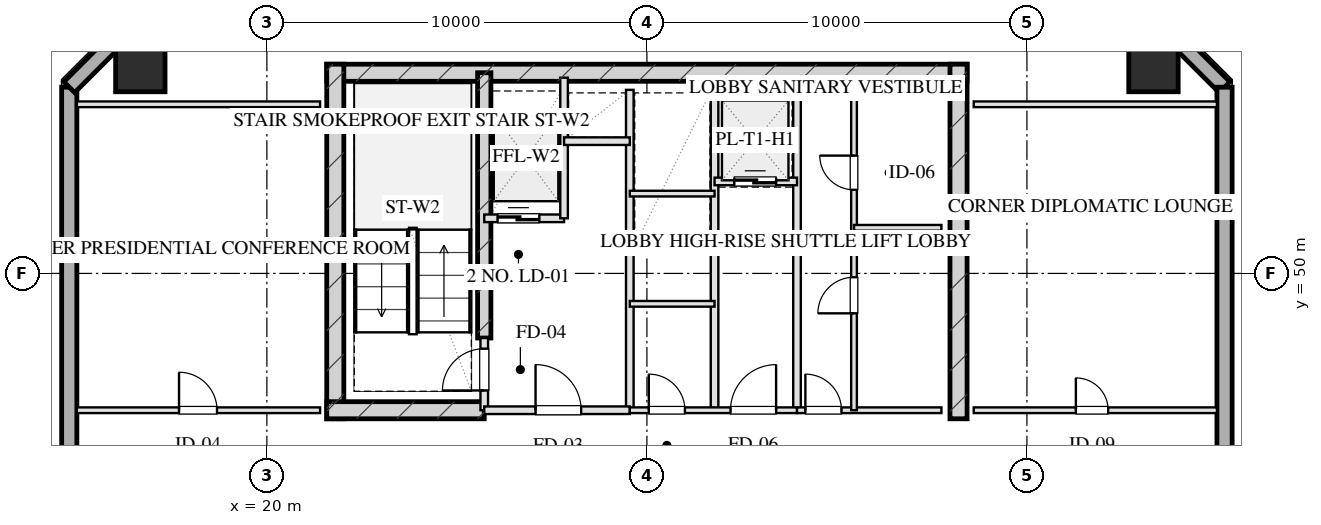
"""IFC4 building model, lengths in metres.
Left out: names, types, materials, properties, quantities, classifications, styles, units other than length and angle.
Written with IfcOpenShell. Run it as: python <this file> out.ifc"""

import sys

from ifc_helpers import new_model, si_unit, direction, frame, frame_2d, origin, origin_2d, place, context, subcontext, project, spatial, rectangle, hollow_rectangle, extrude, element, fill, save


model = new_model("IFC4")
c1 = context("Model", 3, precision=1e-05, world=origin(), true_north=direction((0.0, 1.0)))
c2 = subcontext(c1, "Body", "Model", "MODEL_VIEW")
j1 = project(units=[si_unit("LENGTHUNIT", "METRE"), si_unit("PLANEANGLEUNIT", "RADIAN")], contexts=[c1])
p1 = place(None, origin())
s1 = spatial("IfcSite", under=j1, at=p1, CompositionType="ELEMENT")
p2 = place(p1, origin())
s2 = spatial("IfcBuilding", under=s1, at=p2, CompositionType="ELEMENT")
p3 = place(p2, frame((0.0, 0.0, 240.8)))
s3 = spatial("IfcBuildingStorey", under=s2, at=p3, CompositionType="ELEMENT", Elevation=240.8)
p4 = place(p3, frame((21.575, 55.28, 0.0), z_axis=(0.0, 0.0, 1.0), x_axis=(1.0, 0.0, 0.0)))
e1 = element("IfcWall", 1, at=p4, inside=s3, PredefinedType="SHEAR", context=c2, shape_type="SweptSolid", body=[
    extrude(rectangle(XDim=16.85, YDim=0.45, at=frame_2d((8.425, 0.0))), origin(), (0.0, 0.0, 1.0), 3.2),
])
for number, where, z_axis, x_axis in (
    (2, (21.8, 46.175, 0.0), (0.0, 0.0, 1.0), (0.0, 1.0, 0.0)),
    (3, (38.2, 46.175, 0.0), (0.0, 0.0, 1.0), (0.0, 1.0, 0.0)),
):
    element("IfcWall", number, at=place(p3, frame(where, z_axis=z_axis, x_axis=x_axis)), inside=s3, PredefinedType="SHEAR", context=c2, shape_type="SweptSolid", body=[
        extrude(rectangle(XDim=9.33, YDim=0.45, at=frame_2d((4.665, 0.0))), origin(), (0.0, 0.0, 1.0), 3.2),
    ])
p5 = place(p3, frame((25.72, 48.3, 0.0), z_axis=(0.0, 0.0, 1.0), x_axis=(0.0, 1.0, 0.0)))
e4 = element("IfcWall", 4, at=p5, inside=s3, PredefinedType="SHEAR", context=c2, shape_type="SweptSolid", body=[
    extrude(rectangle(XDim=6.98, YDim=0.35, at=frame_2d((3.49, 0.0))), origin(), (0.0, 0.0, 1.0), 3.2),
])
p6 = place(p3, frame((21.575, 46.4, 0.0), z_axis=(0.0, 0.0, 1.0), x_axis=(1.0, 0.0, 0.0)))
e5 = element("IfcWall", 5, at=p6, inside=s3, PredefinedType="SHEAR", context=c2, shape_type="SweptSolid", body=[
    extrude(rectangle(XDim=4.145, YDim=0.45, at=frame_2d((2.073, 0.0))), origin(), (0.0, 0.0, 1.0), 3.2),
])
for number, where, z_axis, x_axis in (
    (6, (43.33, 55.43, 0.0), (0.0, 0.0, 1.0), (1.0, 0.0, 0.0)),
    (7, (16.67, 55.43, 0.0), (0.0, 0.0, 1.0), (1.0, 0.0, 0.0)),
):
    element("IfcColumn", number, at=place(p3, frame(where, z_axis=z_axis, x_axis=x_axis)), inside=s3, PredefinedType="COLUMN", context=c2, shape_type="SweptSolid", body=[
        extrude(hollow_rectangle(XDim=1.3, YDim=1.3, WallThickness=0.045, at=origin_2d()), origin(), (0.0, 0.0, 1.0), 3.201),
    ])
p7 = place(p3, frame((14.8, 13.1, 0.0), z_axis=(0.0, 0.0, 1.0), x_axis=(0.0, 1.0, 0.0)))
e8 = element("IfcWall", 8, at=p7, inside=s3, PredefinedType="SOLIDWALL", context=c2, shape_type="SweptSolid", body=[
    extrude(rectangle(XDim=41.8, YDim=0.4, at=frame_2d((20.9, 0.0))), origin(), (0.0, 0.0, 1.0), 2.36),
])
p8 = place(p7, frame((13.525, 0.0, 0.75)))
e9 = element("IfcOpeningElement", 9, at=p8, cuts=e8, PredefinedType="OPENING", context=c2, shape_type="SweptSolid", body=[
    extrude(rectangle(XDim=1.95, YDim=1.21, at=frame_2d((0.975, 0.605))), frame((0.0, 0.21, 0.0), z_axis=(0.0, -1.0, 0.0), x_axis=(1.0, 0.0, 0.0)), (0.0, 0.0, 1.0), 0.42),
])
p9 = place(p7, frame((17.325, 0.0, 0.75)))
e10 = element("IfcOpeningElement", 10, at=p9, cuts=e8, PredefinedType="OPENING", context=c2, shape_type="SweptSolid", body=[
    extrude(rectangle(XDim=1.95, YDim=1.21, at=frame_2d((0.975, 0.605))), frame((0.0, 0.21, 0.0), z_axis=(0.0, -1.0, 0.0), x_axis=(1.0, 0.0, 0.0)), (0.0, 0.0, 1.0), 0.42),
])
p10 = place(p7, frame((23.2, 0.0, 0.0)))
e11 = element("IfcOpeningElement", 11, at=p10, cuts=e8, PredefinedType="OPENING", context=c2, shape_type="SweptSolid", body=[
    extrude(rectangle(XDim=1.1, YDim=2.15, at=frame_2d((0.55, 1.075))), frame((0.0, 0.21, 0.0), z_axis=(0.0, -1.0, 0.0), x_axis=(1.0, 0.0, 0.0)), (0.0, 0.0, 1.0), 0.42),
])
for number, where, z_axis, x_axis in (
    (12, (14.8, 54.9, 0.0), (0.0, 0.0, 1.0), (0.707, 0.707, 0.0)),
    (13, (42.8, 57.3, 0.0), (0.0, 0.0, 1.0), (0.707, -0.707, 0.0)),
):
    element("IfcWall", number, at=place(p3, frame(where, z_axis=z_axis, x_axis=x_axis)), inside=s3, PredefinedType="SOLIDWALL", context=c2, shape_type="SweptSolid", body=[
        extrude(rectangle(XDim=3.394, YDim=0.4, at=frame_2d((1.697, 0.0))), origin(), (0.0, 0.0, 1.0), 2.36),
    ])
p11 = place(p3, frame((45.2, 54.9, 0.0), z_axis=(0.0, 0.0, 1.0), x_axis=(0.0, -1.0, 0.0)))
e14 = element("IfcWall", 14, at=p11, inside=s3, PredefinedType="SOLIDWALL", context=c2, shape_type="SweptSolid", body=[
    extrude(rectangle(XDim=41.8, YDim=0.4, at=frame_2d((20.9, 0.0))), origin(), (0.0, 0.0, 1.0), 2.36),
])
p12 = place(p11, frame((26.325, 0.0, 0.75)))
e15 = element("IfcOpeningElement", 15, at=p12, cuts=e14, PredefinedType="OPENING", context=c2, shape_type="SweptSolid", body=[
    extrude(rectangle(XDim=1.95, YDim=1.21, at=frame_2d((0.975, 0.605))), frame((0.0, 0.21, 0.0), z_axis=(0.0, -1.0, 0.0), x_axis=(1.0, 0.0, 0.0)), (0.0, 0.0, 1.0), 0.42),
])
p13 = place(p11, frame((22.525, 0.0, 0.75)))
e16 = element("IfcOpeningElement", 16, at=p13, cuts=e14, PredefinedType="OPENING", context=c2, shape_type="SweptSolid", body=[
    extrude(rectangle(XDim=1.95, YDim=1.21, at=frame_2d((0.975, 0.605))), frame((0.0, 0.21, 0.0), z_axis=(0.0, -1.0, 0.0), x_axis=(1.0, 0.0, 0.0)), (0.0, 0.0, 1.0), 0.42),
])
p14 = place(p11, frame((17.5, 0.0, 0.0)))
e17 = element("IfcOpeningElement", 17, at=p14, cuts=e14, PredefinedType="OPENING", context=c2, shape_type="SweptSolid", body=[
    extrude(rectangle(XDim=1.1, YDim=2.15, at=frame_2d((0.55, 1.075))), frame((0.0, 0.21, 0.0), z_axis=(0.0, -1.0, 0.0), x_axis=(1.0, 0.0, 0.0)), (0.0, 0.0, 1.0), 0.42),
])
p15 = place(p3, frame((25.72, 46.4, 0.0), z_axis=(0.0, 0.0, 1.0), x_axis=(0.0, 1.0, 0.0)))
e18 = element("IfcWall", 18, at=p15, inside=s3, PredefinedType="PARTITIONING", context=c2, shape_type="SweptSolid", body=[
    extrude(rectangle(XDim=1.9, YDim=0.2, at=frame_2d((0.95, 0.0))), origin(), (0.0, 0.0, 1.0), 2.925),
])
p16 = place(p15, frame((0.52, 0.0, 0.0)))
e19 = element("IfcOpeningElement", 19, at=p16, cuts=e18, PredefinedType="OPENING", context=c2, shape_type="SweptSolid", body=[
    extrude(rectangle(XDim=1.1, YDim=2.05, at=frame_2d((0.55, 1.025))), frame((0.0, 0.11, 0.0), z_axis=(0.0, -1.0, 0.0), x_axis=(1.0, 0.0, 0.0)), (0.0, 0.0, 1.0), 0.22),
])
p17 = place(p3, frame((29.55, 46.4, 0.0), z_axis=(0.0, 0.0, 1.0), x_axis=(0.0, 1.0, 0.0)))
e20 = element("IfcWall", 20, at=p17, inside=s3, PredefinedType="PARTITIONING", context=c2, shape_type="SweptSolid", body=[
    extrude(rectangle(XDim=8.43, YDim=0.2, at=frame_2d((4.215, 0.0))), origin(), (0.0, 0.0, 1.0), 2.925),
])
p18 = place(p3, frame((25.72, 46.4, 0.0), z_axis=(0.0, 0.0, 1.0), x_axis=(1.0, 0.0, 0.0)))
e21 = element("IfcWall", 21, at=p18, inside=s3, PredefinedType="PARTITIONING", context=c2, shape_type="SweptSolid", body=[
    extrude(rectangle(XDim=3.83, YDim=0.2, at=frame_2d((1.915, 0.0))), origin(), (0.0, 0.0, 1.0), 2.925),
])
p19 = place(p18, frame((1.35, 0.0, 0.0)))
e22 = element("IfcOpeningElement", 22, at=p19, cuts=e21, PredefinedType="OPENING", context=c2, shape_type="SweptSolid", body=[
    extrude(rectangle(XDim=1.2, YDim=2.05, at=frame_2d((0.6, 1.025))), frame((0.0, 0.11, 0.0), z_axis=(0.0, -1.0, 0.0), x_axis=(1.0, 0.0, 0.0)), (0.0, 0.0, 1.0), 0.22),
])
p20 = place(p3, frame((25.72, 51.45, 0.0), z_axis=(0.0, 0.0, 1.0), x_axis=(1.0, 0.0, 0.0)))
e23 = element("IfcWall", 23, at=p20, inside=s3, PredefinedType="PARTITIONING", context=c2, shape_type="SweptSolid", body=[
    extrude(rectangle(XDim=2.1, YDim=0.2, at=frame_2d((1.05, 0.0))), origin(), (0.0, 0.0, 1.0), 2.925),
])
p21 = place(p20, frame((0.35, 0.0, 0.0)))
e24 = element("IfcOpeningElement", 24, at=p21, cuts=e23, PredefinedType="OPENING", context=c2, shape_type="SweptSolid", body=[
    extrude(rectangle(XDim=1.1, YDim=2.05, at=frame_2d((0.55, 1.025))), frame((0.0, 0.11, 0.0), z_axis=(0.0, -1.0, 0.0), x_axis=(1.0, 0.0, 0.0)), (0.0, 0.0, 1.0), 0.22),
])
p22 = place(p3, frame((27.82, 51.45, 0.0), z_axis=(0.0, 0.0, 1.0), x_axis=(0.0, 1.0, 0.0)))
e25 = element("IfcWall", 25, at=p22, inside=s3, PredefinedType="PARTITIONING", context=c2, shape_type="SweptSolid", body=[
    extrude(rectangle(XDim=3.7, YDim=0.2, at=frame_2d((1.85, 0.0))), origin(), (0.0, 0.0, 1.0), 2.925),
])
p23 = place(p3, frame((27.82, 53.48, 0.0), z_axis=(0.0, 0.0, 1.0), x_axis=(1.0, 0.0, 0.0)))
e26 = element("IfcWall", 26, at=p23, inside=s3, PredefinedType="PARTITIONING", context=c2, shape_type="SweptSolid", body=[
    extrude(rectangle(XDim=1.73, YDim=0.2, at=frame_2d((0.865, 0.0))), origin(), (0.0, 0.0, 1.0), 2.925),
])
for number, where, z_axis, x_axis in (
    (27, (33.95, 46.4, 0.0), (0.0, 0.0, 1.0), (0.0, 1.0, 0.0)),
    (28, (31.78, 46.4, 0.0), (0.0, 0.0, 1.0), (0.0, 1.0, 0.0)),
):
    element("IfcWall", number, at=place(p3, frame(where, z_axis=z_axis, x_axis=x_axis)), inside=s3, PredefinedType="PARTITIONING", context=c2, shape_type="SweptSolid", body=[
        extrude(rectangle(XDim=8.43, YDim=0.2, at=frame_2d((4.215, 0.0))), origin(), (0.0, 0.0, 1.0), 2.925),
    ])
p24 = place(p3, frame((29.55, 46.4, 0.0), z_axis=(0.0, 0.0, 1.0), x_axis=(1.0, 0.0, 0.0)))
e29 = element("IfcWall", 29, at=p24, inside=s3, PredefinedType="PARTITIONING", context=c2, shape_type="SweptSolid", body=[
    extrude(rectangle(XDim=4.4, YDim=0.15, at=frame_2d((2.2, 0.0))), origin(), (0.0, 0.0, 1.0), 2.925),
])
p25 = place(p24, frame((0.5, 0.0, 0.0)))
e30 = element("IfcOpeningElement", 30, at=p25, cuts=e29, PredefinedType="OPENING", context=c2, shape_type="SweptSolid", body=[
    extrude(rectangle(XDim=0.95, YDim=2.05, at=frame_2d((0.475, 1.025))), frame((0.0, 0.085, 0.0), z_axis=(0.0, -1.0, 0.0), x_axis=(1.0, 0.0, 0.0)), (0.0, 0.0, 1.0), 0.17),
])
p26 = place(p24, frame((2.65, 0.0, 0.0)))
e31 = element("IfcOpeningElement", 31, at=p26, cuts=e29, PredefinedType="OPENING", context=c2, shape_type="SweptSolid", body=[
    extrude(rectangle(XDim=1.2, YDim=2.05, at=frame_2d((0.6, 1.025))), frame((0.0, 0.085, 0.0), z_axis=(0.0, -1.0, 0.0), x_axis=(1.0, 0.0, 0.0)), (0.0, 0.0, 1.0), 0.17),
])
for number, where, z_axis, x_axis in (
    (32, (29.55, 49.2, 0.0), (0.0, 0.0, 1.0), (1.0, 0.0, 0.0)),
    (33, (29.55, 52.1, 0.0), (0.0, 0.0, 1.0), (1.0, 0.0, 0.0)),
):
    element("IfcWall", number, at=place(p3, frame(where, z_axis=z_axis, x_axis=x_axis)), inside=s3, PredefinedType="PARTITIONING", context=c2, shape_type="SweptSolid", body=[
        extrude(rectangle(XDim=2.23, YDim=0.15, at=frame_2d((1.115, 0.0))), origin(), (0.0, 0.0, 1.0), 2.925),
    ])
p27 = place(p3, frame((31.78, 52.42, 0.0), z_axis=(0.0, 0.0, 1.0), x_axis=(1.0, 0.0, 0.0)))
e34 = element("IfcWall", 34, at=p27, inside=s3, PredefinedType="PARTITIONING", context=c2, shape_type="SweptSolid", body=[
    extrude(rectangle(XDim=2.17, YDim=0.2, at=frame_2d((1.085, 0.0))), origin(), (0.0, 0.0, 1.0), 2.925),
])
p28 = place(p27, frame((0.52, 0.0, 0.0)))
e35 = element("IfcOpeningElement", 35, at=p28, cuts=e34, PredefinedType="OPENING", context=c2, shape_type="SweptSolid", body=[
    extrude(rectangle(XDim=1.1, YDim=2.05, at=frame_2d((0.55, 1.025))), frame((0.0, 0.11, 0.0), z_axis=(0.0, -1.0, 0.0), x_axis=(1.0, 0.0, 0.0)), (0.0, 0.0, 1.0), 0.22),
])
p29 = place(p3, frame((33.95, 46.4, 0.0), z_axis=(0.0, 0.0, 1.0), x_axis=(1.0, 0.0, 0.0)))
e36 = element("IfcWall", 36, at=p29, inside=s3, PredefinedType="PARTITIONING", context=c2, shape_type="SweptSolid", body=[
    extrude(rectangle(XDim=3.8, YDim=0.15, at=frame_2d((1.9, 0.0))), origin(), (0.0, 0.0, 1.0), 2.925),
])
p30 = place(p29, frame((0.22, 0.0, 0.0)))
e37 = element("IfcOpeningElement", 37, at=p30, cuts=e36, PredefinedType="OPENING", context=c2, shape_type="SweptSolid", body=[
    extrude(rectangle(XDim=0.95, YDim=2.05, at=frame_2d((0.475, 1.025))), frame((0.0, 0.085, 0.0), z_axis=(0.0, -1.0, 0.0), x_axis=(1.0, 0.0, 0.0)), (0.0, 0.0, 1.0), 0.17),
])
p31 = place(p3, frame((35.45, 46.4, 0.0), z_axis=(0.0, 0.0, 1.0), x_axis=(0.0, 1.0, 0.0)))
e38 = element("IfcWall", 38, at=p31, inside=s3, PredefinedType="PARTITIONING", context=c2, shape_type="SweptSolid", body=[
    extrude(rectangle(XDim=8.43, YDim=0.15, at=frame_2d((4.215, 0.0))), origin(), (0.0, 0.0, 1.0), 2.565),
])
p32 = place(p31, frame((2.55, 0.0, 0.0)))
e39 = element("IfcOpeningElement", 39, at=p32, cuts=e38, PredefinedType="OPENING", context=c2, shape_type="SweptSolid", body=[
    extrude(rectangle(XDim=0.95, YDim=2.05, at=frame_2d((0.475, 1.025))), frame((0.0, 0.085, 0.0), z_axis=(0.0, -1.0, 0.0), x_axis=(1.0, 0.0, 0.0)), (0.0, 0.0, 1.0), 0.17),
])
p33 = place(p31, frame((5.8, 0.0, 0.0)))
e40 = element("IfcOpeningElement", 40, at=p33, cuts=e38, PredefinedType="OPENING", context=c2, shape_type="SweptSolid", body=[
    extrude(rectangle(XDim=0.9, YDim=2.05, at=frame_2d((0.45, 1.025))), frame((0.0, 0.085, 0.0), z_axis=(0.0, -1.0, 0.0), x_axis=(1.0, 0.0, 0.0)), (0.0, 0.0, 1.0), 0.17),
])
p34 = place(p3, frame((35.45, 51.2, 0.0), z_axis=(0.0, 0.0, 1.0), x_axis=(1.0, 0.0, 0.0)))
e41 = element("IfcWall", 41, at=p34, inside=s3, PredefinedType="PARTITIONING", context=c2, shape_type="SweptSolid", body=[
    extrude(rectangle(XDim=2.3, YDim=0.15, at=frame_2d((1.15, 0.0))), origin(), (0.0, 0.0, 1.0), 2.925),
])
p35 = place(p3, frame((15.0, 54.45, 0.0), z_axis=(0.0, 0.0, 1.0), x_axis=(1.0, 0.0, 0.0)))
e42 = element("IfcWall", 42, at=p35, inside=s3, PredefinedType="PARTITIONING", context=c2, shape_type="SweptSolid", body=[
    extrude(rectangle(XDim=6.4, YDim=0.15, at=frame_2d((3.2, 0.0))), origin(), (0.0, 0.0, 1.0), 2.925),
])
p36 = place(p3, frame((15.0, 46.4, 0.0), z_axis=(0.0, 0.0, 1.0), x_axis=(1.0, 0.0, 0.0)))
e43 = element("IfcWall", 43, at=p36, inside=s3, PredefinedType="PARTITIONING", context=c2, shape_type="SweptSolid", body=[
    extrude(rectangle(XDim=6.4, YDim=0.15, at=frame_2d((3.2, 0.0))), origin(), (0.0, 0.0, 1.0), 2.925),
])
p37 = place(p36, frame((2.688, 0.0, 0.0)))
e44 = element("IfcOpeningElement", 44, at=p37, cuts=e43, PredefinedType="OPENING", context=c2, shape_type="SweptSolid", body=[
    extrude(rectangle(XDim=1.0, YDim=2.05, at=frame_2d((0.5, 1.025))), frame((0.0, 0.085, 0.0), z_axis=(0.0, -1.0, 0.0), x_axis=(1.0, 0.0, 0.0)), (0.0, 0.0, 1.0), 0.17),
])
p38 = place(p3, frame((38.6, 54.45, 0.0), z_axis=(0.0, 0.0, 1.0), x_axis=(1.0, 0.0, 0.0)))
e45 = element("IfcWall", 45, at=p38, inside=s3, PredefinedType="PARTITIONING", context=c2, shape_type="SweptSolid", body=[
    extrude(rectangle(XDim=6.4, YDim=0.15, at=frame_2d((3.2, 0.0))), origin(), (0.0, 0.0, 1.0), 2.925),
])
p39 = place(p3, frame((38.6, 46.4, 0.0), z_axis=(0.0, 0.0, 1.0), x_axis=(1.0, 0.0, 0.0)))
e46 = element("IfcWall", 46, at=p39, inside=s3, PredefinedType="PARTITIONING", context=c2, shape_type="SweptSolid", body=[
    extrude(rectangle(XDim=6.4, YDim=0.15, at=frame_2d((3.2, 0.0))), origin(), (0.0, 0.0, 1.0), 2.925),
])
p40 = place(p39, frame((2.688, 0.0, 0.0)))
e47 = element("IfcOpeningElement", 47, at=p40, cuts=e46, PredefinedType="OPENING", context=c2, shape_type="SweptSolid", body=[
    extrude(rectangle(XDim=0.85, YDim=2.05, at=frame_2d((0.425, 1.025))), frame((0.0, 0.085, 0.0), z_axis=(0.0, -1.0, 0.0), x_axis=(1.0, 0.0, 0.0)), (0.0, 0.0, 1.0), 0.17),
])
p41 = place(p16, origin())
e48 = element("IfcDoor", 48, at=p41, inside=s3, OperationType="SINGLE_SWING_LEFT", PredefinedType="DOOR", context=c2, shape_type="SweptSolid", body=[
    extrude(rectangle(XDim=1.1, YDim=2.05, at=frame_2d((0.55, 1.025))), frame((0.0, 0.025, 0.0), z_axis=(0.0, -1.0, 0.0), x_axis=(1.0, 0.0, 0.0)), (0.0, 0.0, 1.0), 0.05),
])
fill(e19, e48)
p42 = place(p19, origin())
e49 = element("IfcDoor", 49, at=p42, inside=s3, OperationType="SINGLE_SWING_LEFT", PredefinedType="DOOR", context=c2, shape_type="SweptSolid", body=[
    extrude(rectangle(XDim=1.2, YDim=2.05, at=frame_2d((0.6, 1.025))), frame((0.0, 0.025, 0.0), z_axis=(0.0, -1.0, 0.0), x_axis=(1.0, 0.0, 0.0)), (0.0, 0.0, 1.0), 0.05),
])
fill(e22, e49)
p43 = place(p21, origin())
e50 = element("IfcDoor", 50, at=p43, inside=s3, OperationType="DOUBLE_DOOR_SLIDING", PredefinedType="DOOR", context=c2, shape_type="SweptSolid", body=[
    extrude(rectangle(XDim=1.1, YDim=2.05, at=frame_2d((0.55, 1.025))), frame((0.0, 0.025, 0.0), z_axis=(0.0, -1.0, 0.0), x_axis=(1.0, 0.0, 0.0)), (0.0, 0.0, 1.0), 0.05),
])
fill(e24, e50)
p44 = place(p25, origin())
e51 = element("IfcDoor", 51, at=p44, inside=s3, OperationType="SINGLE_SWING_LEFT", PredefinedType="DOOR", context=c2, shape_type="SweptSolid", body=[
    extrude(rectangle(XDim=0.95, YDim=2.05, at=frame_2d((0.475, 1.025))), frame((0.0, 0.025, 0.0), z_axis=(0.0, -1.0, 0.0), x_axis=(1.0, 0.0, 0.0)), (0.0, 0.0, 1.0), 0.05),
])
fill(e30, e51)
p45 = place(p26, origin())
e52 = element("IfcDoor", 52, at=p45, inside=s3, OperationType="SINGLE_SWING_RIGHT", PredefinedType="DOOR", context=c2, shape_type="SweptSolid", body=[
    extrude(rectangle(XDim=1.2, YDim=2.05, at=frame_2d((0.6, 1.025))), frame((0.0, 0.025, 0.0), z_axis=(0.0, -1.0, 0.0), x_axis=(1.0, 0.0, 0.0)), (0.0, 0.0, 1.0), 0.05),
])
fill(e31, e52)
p46 = place(p28, origin())
e53 = element("IfcDoor", 53, at=p46, inside=s3, OperationType="DOUBLE_DOOR_SLIDING", PredefinedType="DOOR", context=c2, shape_type="SweptSolid", body=[
    extrude(rectangle(XDim=1.1, YDim=2.05, at=frame_2d((0.55, 1.025))), frame((0.0, 0.025, 0.0), z_axis=(0.0, -1.0, 0.0), x_axis=(1.0, 0.0, 0.0)), (0.0, 0.0, 1.0), 0.05),
])
fill(e35, e53)
p47 = place(p30, origin())
e54 = element("IfcDoor", 54, at=p47, inside=s3, OperationType="SINGLE_SWING_LEFT", PredefinedType="DOOR", context=c2, shape_type="SweptSolid", body=[
    extrude(rectangle(XDim=0.95, YDim=2.05, at=frame_2d((0.475, 1.025))), frame((0.0, 0.025, 0.0), z_axis=(0.0, -1.0, 0.0), x_axis=(1.0, 0.0, 0.0)), (0.0, 0.0, 1.0), 0.05),
])
fill(e37, e54)
p48 = place(p32, origin())
e55 = element("IfcDoor", 55, at=p48, inside=s3, OperationType="SINGLE_SWING_LEFT", PredefinedType="DOOR", context=c2, shape_type="SweptSolid", body=[
    extrude(rectangle(XDim=0.95, YDim=2.05, at=frame_2d((0.475, 1.025))), frame((0.0, 0.025, 0.0), z_axis=(0.0, -1.0, 0.0), x_axis=(1.0, 0.0, 0.0)), (0.0, 0.0, 1.0), 0.05),
])
fill(e39, e55)
p49 = place(p33, origin())
e56 = element("IfcDoor", 56, at=p49, inside=s3, OperationType="SINGLE_SWING_RIGHT", PredefinedType="DOOR", context=c2, shape_type="SweptSolid", body=[
    extrude(rectangle(XDim=0.9, YDim=2.05, at=frame_2d((0.45, 1.025))), frame((0.0, 0.025, 0.0), z_axis=(0.0, -1.0, 0.0), x_axis=(1.0, 0.0, 0.0)), (0.0, 0.0, 1.0), 0.05),
])
fill(e40, e56)
p50 = place(p37, origin())
e57 = element("IfcDoor", 57, at=p50, inside=s3, OperationType="SINGLE_SWING_LEFT", PredefinedType="DOOR", context=c2, shape_type="SweptSolid", body=[
    extrude(rectangle(XDim=1.0, YDim=2.05, at=frame_2d((0.5, 1.025))), frame((0.0, 0.025, 0.0), z_axis=(0.0, -1.0, 0.0), x_axis=(1.0, 0.0, 0.0)), (0.0, 0.0, 1.0), 0.05),
])
fill(e44, e57)
p51 = place(p40, origin())
e58 = element("IfcDoor", 58, at=p51, inside=s3, OperationType="SINGLE_SWING_LEFT", PredefinedType="DOOR", context=c2, shape_type="SweptSolid", body=[
    extrude(rectangle(XDim=0.85, YDim=2.05, at=frame_2d((0.425, 1.025))), frame((0.0, 0.025, 0.0), z_axis=(0.0, -1.0, 0.0), x_axis=(1.0, 0.0, 0.0)), (0.0, 0.0, 1.0), 0.05),
])
fill(e47, e58)
save(model, sys.argv[1])
